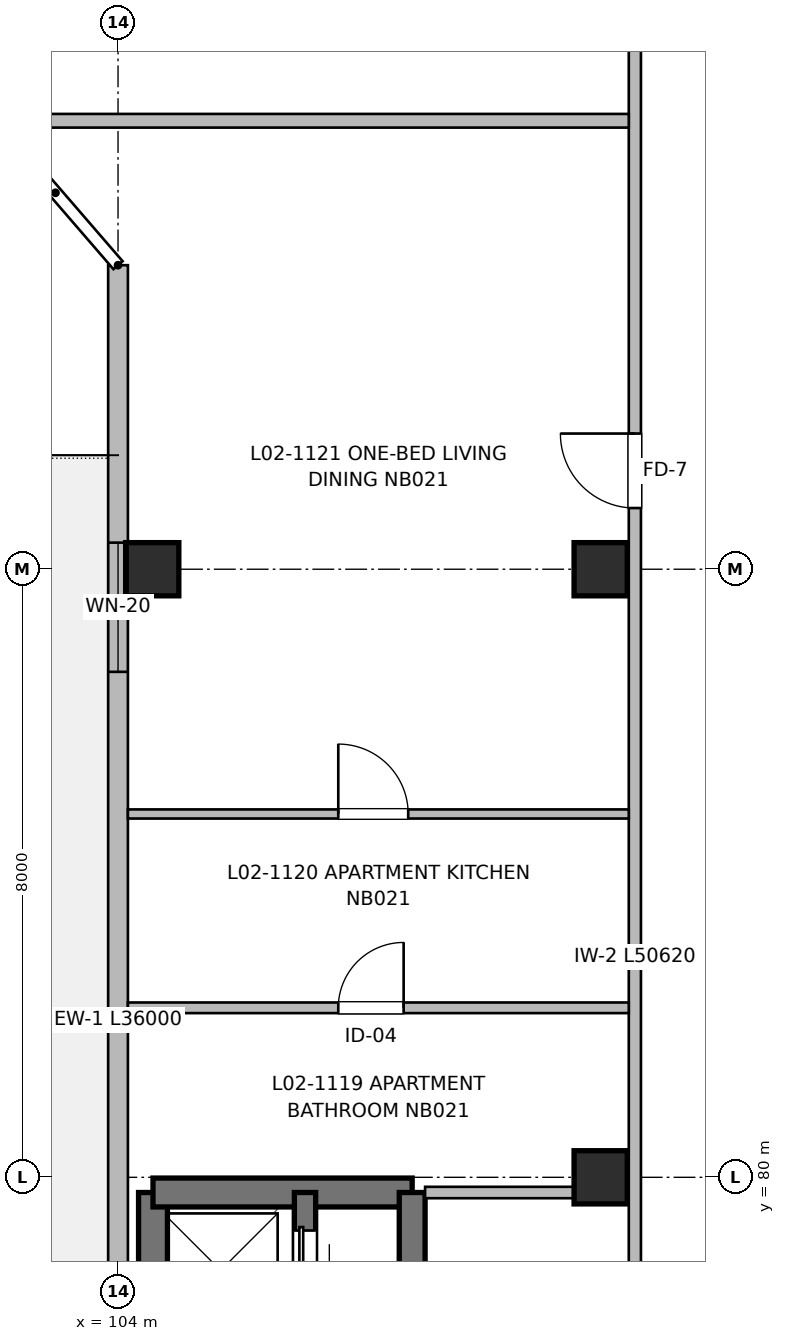
"""IFC4 building model, lengths in metres.
Left out: names, types, materials, properties, quantities, classifications, styles, units other than length and angle.
Written with IfcOpenShell. Run it as: python <this file> out.ifc"""

import sys

from ifc_helpers import new_model, si_unit, direction, frame, frame_2d, origin, origin_2d, place, context, subcontext, project, spatial, rectangle, extrude, element, fill, save


model = new_model("IFC4")
c1 = context("Model", 3, precision=1e-05, world=origin(), true_north=direction((0.0, 1.0)))
c2 = subcontext(c1, "Body", "Model", "MODEL_VIEW")
j1 = project(units=[si_unit("LENGTHUNIT", "METRE"), si_unit("PLANEANGLEUNIT", "RADIAN")], contexts=[c1])
p1 = place(None, origin())
s1 = spatial("IfcSite", under=j1, at=p1, CompositionType="ELEMENT")
p2 = place(p1, origin())
s2 = spatial("IfcBuilding", under=s1, at=p2, CompositionType="ELEMENT")
p3 = place(p2, frame((0.0, 0.0, 7.36)))
s3 = spatial("IfcBuildingStorey", under=s2, at=p3, CompositionType="ELEMENT", Elevation=7.36)
for number, where, z_axis, x_axis in (
    (1, (104.45, 88.0, 0.0), (0.0, 0.0, 1.0), (1.0, 0.0, 0.0)),
    (2, (110.35, 80.0, 0.0), (0.0, 0.0, 1.0), (1.0, 0.0, 0.0)),
    (3, (110.35, 88.0, 0.0), (0.0, 0.0, 1.0), (1.0, 0.0, 0.0)),
):
    element("IfcColumn", number, at=place(p3, frame(where, z_axis=z_axis, x_axis=x_axis)), inside=s3, PredefinedType="COLUMN", context=c2, shape_type="SweptSolid", body=[
        extrude(rectangle(XDim=0.7, YDim=0.7, at=origin_2d()), origin(), (0.0, 0.0, 1.0), 3.2),
    ])
p4 = place(p3, frame((104.46, 67.35, 0.0), z_axis=(0.0, 0.0, 1.0), x_axis=(0.0, 1.0, 0.0)))
e4 = element("IfcWall", 4, at=p4, inside=s3, PredefinedType="SHEAR", context=c2, shape_type="SweptSolid", body=[
    extrude(rectangle(XDim=12.45, YDim=0.38, at=frame_2d((6.225, 0.0))), origin(), (0.0, 0.0, 1.0), 3.2),
])
p5 = place(p4, frame((2.2, 0.0, 0.97)))
e5 = element("IfcOpeningElement", 5, at=p5, cuts=e4, PredefinedType="OPENING", context=c2, shape_type="SweptSolid", body=[
    extrude(rectangle(XDim=0.95, YDim=1.25, at=frame_2d((0.475, 0.625))), frame((0.0, 0.2, 0.0), z_axis=(0.0, -1.0, 0.0), x_axis=(1.0, 0.0, 0.0)), (0.0, 0.0, 1.0), 0.4),
])
p6 = place(p3, frame((104.46, 79.8, 0.0), z_axis=(0.0, 0.0, 1.0), x_axis=(1.0, 0.0, 0.0)))
e6 = element("IfcWall", 6, at=p6, inside=s3, PredefinedType="SHEAR", context=c2, shape_type="SweptSolid", body=[
    extrude(rectangle(XDim=3.41, YDim=0.38, at=frame_2d((1.705, 0.0))), origin(), (0.0, 0.0, 1.0), 3.2),
])
p7 = place(p3, frame((107.87, 79.8, 0.0), z_axis=(0.0, 0.0, 1.0), x_axis=(0.0, -1.0, 0.0)))
e7 = element("IfcWall", 7, at=p7, inside=s3, PredefinedType="SHEAR", context=c2, shape_type="SweptSolid", body=[
    extrude(rectangle(XDim=12.45, YDim=0.34, at=frame_2d((6.225, 0.0))), origin(), (0.0, 0.0, 1.0), 3.2),
])
p8 = place(p7, frame((10.85, 0.0, 0.0)))
e8 = element("IfcOpeningElement", 8, at=p8, cuts=e7, PredefinedType="OPENING", context=c2, shape_type="SweptSolid", body=[
    extrude(rectangle(XDim=1.05, YDim=2.15, at=frame_2d((0.525, 1.075))), frame((0.0, 0.18, 0.0), z_axis=(0.0, -1.0, 0.0), x_axis=(1.0, 0.0, 0.0)), (0.0, 0.0, 1.0), 0.36),
])
p9 = place(p3, frame((106.46, 74.55, 0.0), z_axis=(0.0, 0.0, 1.0), x_axis=(0.0, 1.0, 0.0)))
e9 = element("IfcWall", 9, at=p9, inside=s3, PredefinedType="SHEAR", context=c2, shape_type="SweptSolid", body=[
    extrude(rectangle(XDim=5.25, YDim=0.28, at=frame_2d((2.625, 0.0))), origin(), (0.0, 0.0, 1.0), 3.2),
])
p10 = place(p9, frame((1.15, 0.0, 0.0)))
e10 = element("IfcOpeningElement", 10, at=p10, cuts=e9, PredefinedType="OPENING", context=c2, shape_type="SweptSolid", body=[
    extrude(rectangle(XDim=1.0, YDim=2.15, at=frame_2d((0.5, 1.075))), frame((0.0, 0.15, 0.0), z_axis=(0.0, -1.0, 0.0), x_axis=(1.0, 0.0, 0.0)), (0.0, 0.0, 1.0), 0.3),
])
p11 = place(p9, frame((3.85, 0.0, 0.0)))
e11 = element("IfcOpeningElement", 11, at=p11, cuts=e9, PredefinedType="OPENING", context=c2, shape_type="SweptSolid", body=[
    extrude(rectangle(XDim=0.9, YDim=2.15, at=frame_2d((0.45, 1.075))), frame((0.0, 0.15, 0.0), z_axis=(0.0, -1.0, 0.0), x_axis=(1.0, 0.0, 0.0)), (0.0, 0.0, 1.0), 0.3),
])
p12 = place(p3, frame((104.0, 56.0, 0.0), z_axis=(0.0, 0.0, 1.0), x_axis=(0.0, 1.0, 0.0)))
e12 = element("IfcWall", 12, at=p12, inside=s3, PredefinedType="SOLIDWALL", context=c2, shape_type="SweptSolid", body=[
    extrude(rectangle(XDim=36.0, YDim=0.26, at=frame_2d((18.0, 0.0))), origin(), (0.0, 0.0, 1.0), 2.98),
])
p13 = place(p12, frame((3.9, 0.0, 0.0)))
e13 = element("IfcOpeningElement", 13, at=p13, cuts=e12, PredefinedType="OPENING", context=c2, shape_type="SweptSolid", body=[
    extrude(rectangle(XDim=1.2, YDim=2.2, at=frame_2d((0.6, 1.1))), frame((0.0, 0.14, 0.0), z_axis=(0.0, -1.0, 0.0), x_axis=(1.0, 0.0, 0.0)), (0.0, 0.0, 1.0), 0.28),
])
p14 = place(p12, frame((5.8, 0.0, 0.72)))
e14 = element("IfcOpeningElement", 14, at=p14, cuts=e12, PredefinedType="OPENING", context=c2, shape_type="SweptSolid", body=[
    extrude(rectangle(XDim=1.95, YDim=1.5, at=frame_2d((0.975, 0.75))), frame((0.0, 0.14, 0.0), z_axis=(0.0, -1.0, 0.0), x_axis=(1.0, 0.0, 0.0)), (0.0, 0.0, 1.0), 0.28),
])
p15 = place(p12, frame((12.95, 0.0, 0.62)))
e15 = element("IfcOpeningElement", 15, at=p15, cuts=e12, PredefinedType="OPENING", context=c2, shape_type="SweptSolid", body=[
    extrude(rectangle(XDim=1.1, YDim=1.6, at=frame_2d((0.55, 0.8))), frame((0.0, 0.14, 0.0), z_axis=(0.0, -1.0, 0.0), x_axis=(1.0, 0.0, 0.0)), (0.0, 0.0, 1.0), 0.28),
])
p16 = place(p12, frame((18.8, 0.0, 0.47)))
e16 = element("IfcOpeningElement", 16, at=p16, cuts=e12, PredefinedType="OPENING", context=c2, shape_type="SweptSolid", body=[
    extrude(rectangle(XDim=2.7, YDim=1.75, at=frame_2d((1.35, 0.875))), frame((0.0, 0.14, 0.0), z_axis=(0.0, -1.0, 0.0), x_axis=(1.0, 0.0, 0.0)), (0.0, 0.0, 1.0), 0.28),
])
p17 = place(p12, frame((30.65, 0.0, 0.72)))
e17 = element("IfcOpeningElement", 17, at=p17, cuts=e12, PredefinedType="OPENING", context=c2, shape_type="SweptSolid", body=[
    extrude(rectangle(XDim=1.7, YDim=1.5, at=frame_2d((0.85, 0.75))), frame((0.0, 0.14, 0.0), z_axis=(0.0, -1.0, 0.0), x_axis=(1.0, 0.0, 0.0)), (0.0, 0.0, 1.0), 0.28),
])
p18 = place(p3, frame((108.04, 79.8, 0.0), z_axis=(0.0, 0.0, 1.0), x_axis=(1.0, 0.0, 0.0)))
e18 = element("IfcWall", 18, at=p18, inside=s3, PredefinedType="PARTITIONING", context=c2, shape_type="SweptSolid", body=[
    extrude(rectangle(XDim=2.68, YDim=0.15, at=frame_2d((1.34, 0.0))), origin(), (0.0, 0.0, 1.0), 2.935),
])
p19 = place(p3, frame((110.8, 56.18, 0.0), z_axis=(0.0, 0.0, 1.0), x_axis=(0.0, 1.0, 0.0)))
e19 = element("IfcWall", 19, at=p19, inside=s3, PredefinedType="PARTITIONING", context=c2, shape_type="SweptSolid", body=[
    extrude(rectangle(XDim=50.62, YDim=0.16, at=frame_2d((25.31, 0.0))), origin(), (0.0, 0.0, 1.0), 2.935),
])
p20 = place(p19, frame((12.82, 0.0, 0.0)))
e20 = element("IfcOpeningElement", 20, at=p20, cuts=e19, PredefinedType="OPENING", context=c2, shape_type="SweptSolid", body=[
    extrude(rectangle(XDim=1.1, YDim=2.15, at=frame_2d((0.55, 1.075))), frame((0.0, 0.09, 0.0), z_axis=(0.0, -1.0, 0.0), x_axis=(1.0, 0.0, 0.0)), (0.0, 0.0, 1.0), 0.18),
])
p21 = place(p19, frame((19.22, 0.0, 0.0)))
e21 = element("IfcOpeningElement", 21, at=p21, cuts=e19, PredefinedType="OPENING", context=c2, shape_type="SweptSolid", body=[
    extrude(rectangle(XDim=1.6, YDim=2.15, at=frame_2d((0.8, 1.075))), frame((0.0, 0.09, 0.0), z_axis=(0.0, -1.0, 0.0), x_axis=(1.0, 0.0, 0.0)), (0.0, 0.0, 1.0), 0.18),
])
p22 = place(p19, frame((1.8, 0.0, 0.0)))
e22 = element("IfcOpeningElement", 22, at=p22, cuts=e19, PredefinedType="OPENING", context=c2, shape_type="SweptSolid", body=[
    extrude(rectangle(XDim=0.96, YDim=2.15, at=frame_2d((0.48, 1.075))), frame((0.0, 0.09, 0.0), z_axis=(0.0, -1.0, 0.0), x_axis=(1.0, 0.0, 0.0)), (0.0, 0.0, 1.0), 0.18),
])
p23 = place(p19, frame((32.625, 0.0, 0.0)))
e23 = element("IfcOpeningElement", 23, at=p23, cuts=e19, PredefinedType="OPENING", context=c2, shape_type="SweptSolid", body=[
    extrude(rectangle(XDim=0.98, YDim=2.15, at=frame_2d((0.49, 1.075))), frame((0.0, 0.09, 0.0), z_axis=(0.0, -1.0, 0.0), x_axis=(1.0, 0.0, 0.0)), (0.0, 0.0, 1.0), 0.18),
])
p24 = place(p19, frame((41.235, 0.0, 0.0)))
e24 = element("IfcOpeningElement", 24, at=p24, cuts=e19, PredefinedType="OPENING", context=c2, shape_type="SweptSolid", body=[
    extrude(rectangle(XDim=0.98, YDim=2.15, at=frame_2d((0.49, 1.075))), frame((0.0, 0.09, 0.0), z_axis=(0.0, -1.0, 0.0), x_axis=(1.0, 0.0, 0.0)), (0.0, 0.0, 1.0), 0.18),
])
p25 = place(p3, frame((102.411, 93.9, 0.0), z_axis=(0.0, 0.0, 1.0), x_axis=(1.0, 0.0, 0.0)))
e25 = element("IfcWall", 25, at=p25, inside=s3, PredefinedType="PARTITIONING", context=c2, shape_type="SweptSolid", body=[
    extrude(rectangle(XDim=8.309, YDim=0.18, at=frame_2d((4.155, 0.0))), origin(), (0.0, 0.0, 1.0), 2.935),
])
p26 = place(p3, frame((104.13, 82.23, 0.0), z_axis=(0.0, 0.0, 1.0), x_axis=(1.0, 0.0, 0.0)))
e26 = element("IfcWall", 26, at=p26, inside=s3, PredefinedType="PARTITIONING", context=c2, shape_type="SweptSolid", body=[
    extrude(rectangle(XDim=6.59, YDim=0.14, at=frame_2d((3.295, 0.0))), origin(), (0.0, 0.0, 1.0), 2.935),
])
p27 = place(p26, frame((2.768, 0.0, 0.0)))
e27 = element("IfcOpeningElement", 27, at=p27, cuts=e26, PredefinedType="OPENING", context=c2, shape_type="SweptSolid", body=[
    extrude(rectangle(XDim=0.86, YDim=2.1, at=frame_2d((0.43, 1.05))), frame((0.0, 0.08, 0.0), z_axis=(0.0, -1.0, 0.0), x_axis=(1.0, 0.0, 0.0)), (0.0, 0.0, 1.0), 0.16),
])
p28 = place(p3, frame((104.13, 84.78, 0.0), z_axis=(0.0, 0.0, 1.0), x_axis=(1.0, 0.0, 0.0)))
e28 = element("IfcWall", 28, at=p28, inside=s3, PredefinedType="PARTITIONING", context=c2, shape_type="SweptSolid", body=[
    extrude(rectangle(XDim=6.59, YDim=0.12, at=frame_2d((3.295, 0.0))), origin(), (0.0, 0.0, 1.0), 2.935),
])
p29 = place(p28, frame((2.768, 0.0, 0.0)))
e29 = element("IfcOpeningElement", 29, at=p29, cuts=e28, PredefinedType="OPENING", context=c2, shape_type="SweptSolid", body=[
    extrude(rectangle(XDim=0.92, YDim=2.1, at=frame_2d((0.46, 1.05))), frame((0.0, 0.07, 0.0), z_axis=(0.0, -1.0, 0.0), x_axis=(1.0, 0.0, 0.0)), (0.0, 0.0, 1.0), 0.14),
])
p30 = place(p11, origin())
e30 = element("IfcDoor", 30, at=p30, inside=s3, OperationType="SLIDING_TO_RIGHT", PredefinedType="DOOR", context=c2, shape_type="SweptSolid", body=[
    extrude(rectangle(XDim=0.9, YDim=2.15, at=frame_2d((0.45, 1.075))), frame((0.0, 0.025, 0.0), z_axis=(0.0, -1.0, 0.0), x_axis=(1.0, 0.0, 0.0)), (0.0, 0.0, 1.0), 0.05),
])
fill(e11, e30)
p31 = place(p17, origin())
e31 = element("IfcWindow", 31, at=p31, inside=s3, PartitioningType="SINGLE_PANEL", PredefinedType="WINDOW", context=c2, shape_type="SweptSolid", body=[
    extrude(rectangle(XDim=1.7, YDim=1.5, at=frame_2d((0.85, 0.75))), frame((0.0, 0.03, 0.0), z_axis=(0.0, -1.0, 0.0), x_axis=(1.0, 0.0, 0.0)), (0.0, 0.0, 1.0), 0.06),
])
fill(e17, e31)
p32 = place(p27, origin())
e32 = element("IfcDoor", 32, at=p32, inside=s3, OperationType="SINGLE_SWING_RIGHT", PredefinedType="DOOR", context=c2, shape_type="SweptSolid", body=[
    extrude(rectangle(XDim=0.86, YDim=2.1, at=frame_2d((0.43, 1.05))), frame((0.0, 0.025, 0.0), z_axis=(0.0, -1.0, 0.0), x_axis=(1.0, 0.0, 0.0)), (0.0, 0.0, 1.0), 0.05),
])
fill(e27, e32)
p33 = place(p29, origin())
e33 = element("IfcDoor", 33, at=p33, inside=s3, OperationType="SINGLE_SWING_LEFT", PredefinedType="DOOR", context=c2, shape_type="SweptSolid", body=[
    extrude(rectangle(XDim=0.92, YDim=2.1, at=frame_2d((0.46, 1.05))), frame((0.0, 0.025, 0.0), z_axis=(0.0, -1.0, 0.0), x_axis=(1.0, 0.0, 0.0)), (0.0, 0.0, 1.0), 0.05),
])
fill(e29, e33)
p34 = place(p23, origin())
e34 = element("IfcDoor", 34, at=p34, inside=s3, OperationType="SINGLE_SWING_RIGHT", PredefinedType="DOOR", context=c2, shape_type="SweptSolid", body=[
    extrude(rectangle(XDim=0.98, YDim=2.15, at=frame_2d((0.49, 1.075))), frame((0.0, 0.025, 0.0), z_axis=(0.0, -1.0, 0.0), x_axis=(1.0, 0.0, 0.0)), (0.0, 0.0, 1.0), 0.05),
])
fill(e23, e34)
save(model, sys.argv[1])
